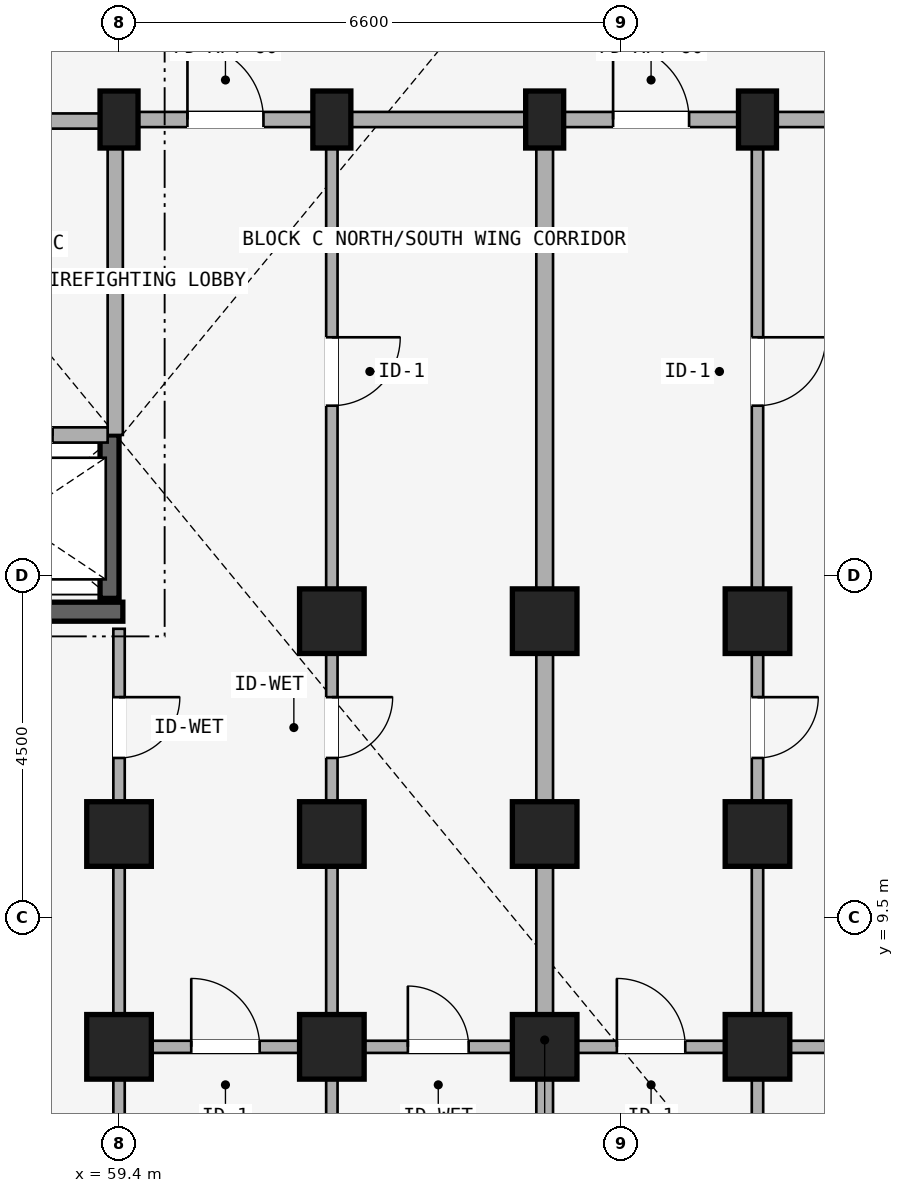
"""IFC4 building model, lengths in metres.
Left out: names, types, materials, properties, quantities, classifications, styles, units other than length and angle.
Written with IfcOpenShell. Run it as: python <this file> out.ifc"""

import sys

from ifc_helpers import new_model, si_unit, direction, frame, frame_2d, origin, origin_2d, place, context, subcontext, project, spatial, rectangle, extrude, element, fill, save


model = new_model("IFC4")
c1 = context("Model", 3, precision=1e-05, world=origin(), true_north=direction((0.0, 1.0)))
c2 = subcontext(c1, "Body", "Model", "MODEL_VIEW")
j1 = project(units=[si_unit("LENGTHUNIT", "METRE"), si_unit("PLANEANGLEUNIT", "RADIAN")], contexts=[c1])
p1 = place(None, origin())
s1 = spatial("IfcSite", under=j1, at=p1, CompositionType="ELEMENT")
p2 = place(p1, origin())
s2 = spatial("IfcBuilding", under=s1, at=p2, CompositionType="ELEMENT")
p3 = place(p2, origin())
s3 = spatial("IfcBuildingStorey", under=s2, at=p3, CompositionType="ELEMENT", Elevation=0.0)
p4 = place(p3, frame((56.65, 13.525, 0.0), z_axis=(0.0, 0.0, 1.0), x_axis=(1.0, 0.0, 0.0)))
e1 = element("IfcWall", 1, at=p4, inside=s3, PredefinedType="SHEAR", context=c2, shape_type="SweptSolid", body=[
    extrude(rectangle(XDim=2.8, YDim=0.25, at=frame_2d((1.4, 0.0))), origin(), (0.0, 0.0, 1.0), 4.15),
])
p5 = place(p3, frame((59.275, 15.85, 0.0), z_axis=(0.0, 0.0, 1.0), x_axis=(0.0, -1.0, 0.0)))
e2 = element("IfcWall", 2, at=p5, inside=s3, PredefinedType="SHEAR", context=c2, shape_type="SweptSolid", body=[
    extrude(rectangle(XDim=2.15, YDim=0.25, at=frame_2d((1.075, 0.0))), origin(), (0.0, 0.0, 1.0), 4.15),
])
p6 = place(p3, frame((59.4, 20.0, 0.0), z_axis=(0.0, 0.0, 1.0), x_axis=(1.0, 0.0, 0.0)))
e3 = element("IfcColumn", 3, at=p6, inside=s3, PredefinedType="COLUMN", context=c2, shape_type="SweptSolid", body=[
    extrude(rectangle(XDim=0.5, YDim=0.75, at=origin_2d()), origin(), (0.0, 0.0, 1.0), 4.15),
])
for number, where, z_axis, x_axis in (
    (4, (59.4, 10.6, 0.0), (0.0, 0.0, 1.0), (1.0, 0.0, 0.0)),
    (5, (59.4, 7.8, 0.0), (0.0, 0.0, 1.0), (1.0, 0.0, 0.0)),
):
    element("IfcColumn", number, at=place(p3, frame(where, z_axis=z_axis, x_axis=x_axis)), inside=s3, PredefinedType="COLUMN", context=c2, shape_type="SweptSolid", body=[
        extrude(rectangle(XDim=0.85, YDim=0.85, at=origin_2d()), origin(), (0.0, 0.0, 1.0), 4.15),
    ])
p7 = place(p3, frame((62.2, 20.0, 0.0), z_axis=(0.0, 0.0, 1.0), x_axis=(1.0, 0.0, 0.0)))
e6 = element("IfcColumn", 6, at=p7, inside=s3, PredefinedType="COLUMN", context=c2, shape_type="SweptSolid", body=[
    extrude(rectangle(XDim=0.5, YDim=0.75, at=origin_2d()), origin(), (0.0, 0.0, 1.0), 4.15),
])
for number, where, z_axis, x_axis in (
    (7, (62.2, 13.4, 0.0), (0.0, 0.0, 1.0), (1.0, 0.0, 0.0)),
    (8, (62.2, 10.6, 0.0), (0.0, 0.0, 1.0), (1.0, 0.0, 0.0)),
    (9, (62.2, 7.8, 0.0), (0.0, 0.0, 1.0), (1.0, 0.0, 0.0)),
):
    element("IfcColumn", number, at=place(p3, frame(where, z_axis=z_axis, x_axis=x_axis)), inside=s3, PredefinedType="COLUMN", context=c2, shape_type="SweptSolid", body=[
        extrude(rectangle(XDim=0.85, YDim=0.85, at=origin_2d()), origin(), (0.0, 0.0, 1.0), 4.15),
    ])
p8 = place(p3, frame((65.0, 20.0, 0.0), z_axis=(0.0, 0.0, 1.0), x_axis=(1.0, 0.0, 0.0)))
e10 = element("IfcColumn", 10, at=p8, inside=s3, PredefinedType="COLUMN", context=c2, shape_type="SweptSolid", body=[
    extrude(rectangle(XDim=0.5, YDim=0.75, at=origin_2d()), origin(), (0.0, 0.0, 1.0), 4.15),
])
for number, where, z_axis, x_axis in (
    (11, (65.0, 13.4, 0.0), (0.0, 0.0, 1.0), (1.0, 0.0, 0.0)),
    (12, (65.0, 10.6, 0.0), (0.0, 0.0, 1.0), (1.0, 0.0, 0.0)),
    (13, (65.0, 7.8, 0.0), (0.0, 0.0, 1.0), (1.0, 0.0, 0.0)),
):
    element("IfcColumn", number, at=place(p3, frame(where, z_axis=z_axis, x_axis=x_axis)), inside=s3, PredefinedType="COLUMN", context=c2, shape_type="SweptSolid", body=[
        extrude(rectangle(XDim=0.85, YDim=0.85, at=origin_2d()), origin(), (0.0, 0.0, 1.0), 4.15),
    ])
p9 = place(p3, frame((67.8, 20.0, 0.0), z_axis=(0.0, 0.0, 1.0), x_axis=(1.0, 0.0, 0.0)))
e14 = element("IfcColumn", 14, at=p9, inside=s3, PredefinedType="COLUMN", context=c2, shape_type="SweptSolid", body=[
    extrude(rectangle(XDim=0.5, YDim=0.75, at=origin_2d()), origin(), (0.0, 0.0, 1.0), 4.15),
])
for number, where, z_axis, x_axis in (
    (15, (67.8, 13.4, 0.0), (0.0, 0.0, 1.0), (1.0, 0.0, 0.0)),
    (16, (67.8, 10.6, 0.0), (0.0, 0.0, 1.0), (1.0, 0.0, 0.0)),
    (17, (67.8, 7.8, 0.0), (0.0, 0.0, 1.0), (1.0, 0.0, 0.0)),
):
    element("IfcColumn", number, at=place(p3, frame(where, z_axis=z_axis, x_axis=x_axis)), inside=s3, PredefinedType="COLUMN", context=c2, shape_type="SweptSolid", body=[
        extrude(rectangle(XDim=0.85, YDim=0.85, at=origin_2d()), origin(), (0.0, 0.0, 1.0), 4.15),
    ])
p10 = place(p3, frame((53.7, 19.98, 0.0), z_axis=(0.0, 0.0, 1.0), x_axis=(1.0, 0.0, 0.0)))
e18 = element("IfcWall", 18, at=p10, inside=s3, PredefinedType="STANDARD", context=c2, shape_type="SweptSolid", body=[
    extrude(rectangle(XDim=5.65, YDim=0.2, at=frame_2d((2.825, 0.0))), origin(), (0.0, 0.0, 1.0), 3.492),
])
p11 = place(p10, frame((1.923, 0.0, 0.0)))
e19 = element("IfcOpeningElement", 19, at=p11, cuts=e18, PredefinedType="OPENING", context=c2, shape_type="SweptSolid", body=[
    extrude(rectangle(XDim=1.24, YDim=2.15, at=frame_2d((0.62, 1.075))), frame((0.0, 0.11, 0.0), z_axis=(0.0, -1.0, 0.0), x_axis=(1.0, 0.0, 0.0)), (0.0, 0.0, 1.0), 0.22),
])
p12 = place(p3, frame((59.35, 19.98, 0.0), z_axis=(0.0, 0.0, 1.0), x_axis=(0.0, -1.0, 0.0)))
e20 = element("IfcWall", 20, at=p12, inside=s3, PredefinedType="STANDARD", context=c2, shape_type="SweptSolid", body=[
    extrude(rectangle(XDim=4.13, YDim=0.2, at=frame_2d((2.065, 0.0))), origin(), (0.0, 0.0, 1.0), 3.492),
])
p13 = place(p3, frame((56.7, 15.85, 0.0), z_axis=(0.0, 0.0, 1.0), x_axis=(1.0, 0.0, 0.0)))
e21 = element("IfcWall", 21, at=p13, inside=s3, PredefinedType="STANDARD", context=c2, shape_type="SweptSolid", body=[
    extrude(rectangle(XDim=2.55, YDim=0.2, at=frame_2d((1.275, 0.0))), origin(), (0.0, 0.0, 1.0), 3.492),
])
p14 = place(p13, frame((0.725, 0.0, 0.0)))
e22 = element("IfcOpeningElement", 22, at=p14, cuts=e21, PredefinedType="OPENING", context=c2, shape_type="SweptSolid", body=[
    extrude(rectangle(XDim=1.1, YDim=2.15, at=frame_2d((0.55, 1.075))), frame((0.0, 0.11, 0.0), z_axis=(0.0, -1.0, 0.0), x_axis=(1.0, 0.0, 0.0)), (0.0, 0.0, 1.0), 0.22),
])
p15 = place(p3, frame((59.4, 20.0, 0.0), z_axis=(0.0, 0.0, 1.0), x_axis=(1.0, 0.0, 0.0)))
e23 = element("IfcWall", 23, at=p15, inside=s3, PredefinedType="STANDARD", context=c2, shape_type="SweptSolid", body=[
    extrude(rectangle(XDim=2.8, YDim=0.2, at=frame_2d((1.4, 0.0))), origin(), (0.0, 0.0, 1.0), 3.492),
])
p16 = place(p15, frame((0.9, 0.0, 0.0)))
e24 = element("IfcOpeningElement", 24, at=p16, cuts=e23, PredefinedType="OPENING", context=c2, shape_type="SweptSolid", body=[
    extrude(rectangle(XDim=1.0, YDim=2.15, at=frame_2d((0.5, 1.075))), frame((0.0, 0.11, 0.0), z_axis=(0.0, -1.0, 0.0), x_axis=(1.0, 0.0, 0.0)), (0.0, 0.0, 1.0), 0.22),
])
p17 = place(p3, frame((59.48, 7.8, 0.0), z_axis=(0.0, 0.0, 1.0), x_axis=(1.0, 0.0, 0.0)))
e25 = element("IfcWall", 25, at=p17, inside=s3, PredefinedType="PLUMBINGWALL", context=c2, shape_type="SweptSolid", body=[
    extrude(rectangle(XDim=2.64, YDim=0.16, at=frame_2d((1.32, 0.0))), origin(), (0.0, 0.0, 1.0), 3.492),
])
p18 = place(p17, frame((0.87, 0.0, 0.0)))
e26 = element("IfcOpeningElement", 26, at=p18, cuts=e25, PredefinedType="OPENING", context=c2, shape_type="SweptSolid", body=[
    extrude(rectangle(XDim=0.9, YDim=2.1, at=frame_2d((0.45, 1.05))), frame((0.0, 0.09, 0.0), z_axis=(0.0, -1.0, 0.0), x_axis=(1.0, 0.0, 0.0)), (0.0, 0.0, 1.0), 0.18),
])
p19 = place(p3, frame((62.2, 20.0, 0.0), z_axis=(0.0, 0.0, 1.0), x_axis=(1.0, 0.0, 0.0)))
e27 = element("IfcWall", 27, at=p19, inside=s3, PredefinedType="STANDARD", context=c2, shape_type="SweptSolid", body=[
    extrude(rectangle(XDim=2.8, YDim=0.2, at=frame_2d((1.4, 0.0))), origin(), (0.0, 0.0, 1.0), 3.492),
])
p20 = place(p3, frame((62.28, 7.8, 0.0), z_axis=(0.0, 0.0, 1.0), x_axis=(1.0, 0.0, 0.0)))
e28 = element("IfcWall", 28, at=p20, inside=s3, PredefinedType="PLUMBINGWALL", context=c2, shape_type="SweptSolid", body=[
    extrude(rectangle(XDim=2.64, YDim=0.16, at=frame_2d((1.32, 0.0))), origin(), (0.0, 0.0, 1.0), 3.492),
])
p21 = place(p20, frame((0.92, 0.0, 0.0)))
e29 = element("IfcOpeningElement", 29, at=p21, cuts=e28, PredefinedType="OPENING", context=c2, shape_type="SweptSolid", body=[
    extrude(rectangle(XDim=0.8, YDim=2.1, at=frame_2d((0.4, 1.05))), frame((0.0, 0.09, 0.0), z_axis=(0.0, -1.0, 0.0), x_axis=(1.0, 0.0, 0.0)), (0.0, 0.0, 1.0), 0.18),
])
p22 = place(p3, frame((65.0, 20.0, 0.0), z_axis=(0.0, 0.0, 1.0), x_axis=(1.0, 0.0, 0.0)))
e30 = element("IfcWall", 30, at=p22, inside=s3, PredefinedType="STANDARD", context=c2, shape_type="SweptSolid", body=[
    extrude(rectangle(XDim=2.8, YDim=0.2, at=frame_2d((1.4, 0.0))), origin(), (0.0, 0.0, 1.0), 3.492),
])
p23 = place(p22, frame((0.9, 0.0, 0.0)))
e31 = element("IfcOpeningElement", 31, at=p23, cuts=e30, PredefinedType="OPENING", context=c2, shape_type="SweptSolid", body=[
    extrude(rectangle(XDim=1.0, YDim=2.15, at=frame_2d((0.5, 1.075))), frame((0.0, 0.11, 0.0), z_axis=(0.0, -1.0, 0.0), x_axis=(1.0, 0.0, 0.0)), (0.0, 0.0, 1.0), 0.22),
])
p24 = place(p3, frame((65.08, 7.8, 0.0), z_axis=(0.0, 0.0, 1.0), x_axis=(1.0, 0.0, 0.0)))
e32 = element("IfcWall", 32, at=p24, inside=s3, PredefinedType="PLUMBINGWALL", context=c2, shape_type="SweptSolid", body=[
    extrude(rectangle(XDim=2.64, YDim=0.16, at=frame_2d((1.32, 0.0))), origin(), (0.0, 0.0, 1.0), 3.492),
])
p25 = place(p24, frame((0.87, 0.0, 0.0)))
e33 = element("IfcOpeningElement", 33, at=p25, cuts=e32, PredefinedType="OPENING", context=c2, shape_type="SweptSolid", body=[
    extrude(rectangle(XDim=0.9, YDim=2.1, at=frame_2d((0.45, 1.05))), frame((0.0, 0.09, 0.0), z_axis=(0.0, -1.0, 0.0), x_axis=(1.0, 0.0, 0.0)), (0.0, 0.0, 1.0), 0.18),
])
p26 = place(p3, frame((67.8, 20.0, 0.0), z_axis=(0.0, 0.0, 1.0), x_axis=(1.0, 0.0, 0.0)))
e34 = element("IfcWall", 34, at=p26, inside=s3, PredefinedType="STANDARD", context=c2, shape_type="SweptSolid", body=[
    extrude(rectangle(XDim=2.8, YDim=0.2, at=frame_2d((1.4, 0.0))), origin(), (0.0, 0.0, 1.0), 3.492),
])
p27 = place(p3, frame((67.88, 7.8, 0.0), z_axis=(0.0, 0.0, 1.0), x_axis=(1.0, 0.0, 0.0)))
e35 = element("IfcWall", 35, at=p27, inside=s3, PredefinedType="PLUMBINGWALL", context=c2, shape_type="SweptSolid", body=[
    extrude(rectangle(XDim=2.64, YDim=0.16, at=frame_2d((1.32, 0.0))), origin(), (0.0, 0.0, 1.0), 3.492),
])
p28 = place(p27, frame((0.92, 0.0, 0.0)))
e36 = element("IfcOpeningElement", 36, at=p28, cuts=e35, PredefinedType="OPENING", context=c2, shape_type="SweptSolid", body=[
    extrude(rectangle(XDim=0.8, YDim=2.1, at=frame_2d((0.4, 1.05))), frame((0.0, 0.09, 0.0), z_axis=(0.0, -1.0, 0.0), x_axis=(1.0, 0.0, 0.0)), (0.0, 0.0, 1.0), 0.18),
])
p29 = place(p3, frame((59.4, 13.3, 0.0), z_axis=(0.0, 0.0, 1.0), x_axis=(0.0, -1.0, 0.0)))
e37 = element("IfcWall", 37, at=p29, inside=s3, PredefinedType="PARTITIONING", context=c2, shape_type="SweptSolid", body=[
    extrude(rectangle(XDim=10.82, YDim=0.15, at=frame_2d((5.41, 0.0))), origin(), (0.0, 0.0, 1.0), 3.492),
])
p30 = place(p29, frame((0.899, 0.0, 0.0)))
e38 = element("IfcOpeningElement", 38, at=p30, cuts=e37, PredefinedType="OPENING", context=c2, shape_type="SweptSolid", body=[
    extrude(rectangle(XDim=0.8, YDim=2.1, at=frame_2d((0.4, 1.05))), frame((0.0, 0.085, 0.0), z_axis=(0.0, -1.0, 0.0), x_axis=(1.0, 0.0, 0.0)), (0.0, 0.0, 1.0), 0.17),
])
p31 = place(p3, frame((62.2, 19.95, 0.0), z_axis=(0.0, 0.0, 1.0), x_axis=(0.0, -1.0, 0.0)))
e39 = element("IfcWall", 39, at=p31, inside=s3, PredefinedType="PARTITIONING", context=c2, shape_type="SweptSolid", body=[
    extrude(rectangle(XDim=6.53, YDim=0.15, at=frame_2d((3.265, 0.0))), origin(), (0.0, 0.0, 1.0), 3.492),
])
p32 = place(p31, frame((2.815, 0.0, 0.0)))
e40 = element("IfcOpeningElement", 40, at=p32, cuts=e39, PredefinedType="OPENING", context=c2, shape_type="SweptSolid", body=[
    extrude(rectangle(XDim=0.9, YDim=2.1, at=frame_2d((0.45, 1.05))), frame((0.0, 0.085, 0.0), z_axis=(0.0, -1.0, 0.0), x_axis=(1.0, 0.0, 0.0)), (0.0, 0.0, 1.0), 0.17),
])
p33 = place(p3, frame((62.2, 13.3, 0.0), z_axis=(0.0, 0.0, 1.0), x_axis=(0.0, -1.0, 0.0)))
e41 = element("IfcWall", 41, at=p33, inside=s3, PredefinedType="PARTITIONING", context=c2, shape_type="SweptSolid", body=[
    extrude(rectangle(XDim=10.82, YDim=0.15, at=frame_2d((5.41, 0.0))), origin(), (0.0, 0.0, 1.0), 3.492),
])
p34 = place(p33, frame((0.899, 0.0, 0.0)))
e42 = element("IfcOpeningElement", 42, at=p34, cuts=e41, PredefinedType="OPENING", context=c2, shape_type="SweptSolid", body=[
    extrude(rectangle(XDim=0.8, YDim=2.1, at=frame_2d((0.4, 1.05))), frame((0.0, 0.085, 0.0), z_axis=(0.0, -1.0, 0.0), x_axis=(1.0, 0.0, 0.0)), (0.0, 0.0, 1.0), 0.17),
])
p35 = place(p3, frame((65.0, 19.95, 0.0), z_axis=(0.0, 0.0, 1.0), x_axis=(0.0, -1.0, 0.0)))
e43 = element("IfcWall", 43, at=p35, inside=s3, PredefinedType="STANDARD", context=c2, shape_type="SweptSolid", body=[
    extrude(rectangle(XDim=6.53, YDim=0.22, at=frame_2d((3.265, 0.0))), origin(), (0.0, 0.0, 1.0), 3.492),
])
p36 = place(p3, frame((65.0, 13.3, 0.0), z_axis=(0.0, 0.0, 1.0), x_axis=(0.0, -1.0, 0.0)))
e44 = element("IfcWall", 44, at=p36, inside=s3, PredefinedType="STANDARD", context=c2, shape_type="SweptSolid", body=[
    extrude(rectangle(XDim=10.82, YDim=0.22, at=frame_2d((5.41, 0.0))), origin(), (0.0, 0.0, 1.0), 3.492),
])
p37 = place(p3, frame((67.8, 19.95, 0.0), z_axis=(0.0, 0.0, 1.0), x_axis=(0.0, -1.0, 0.0)))
e45 = element("IfcWall", 45, at=p37, inside=s3, PredefinedType="PARTITIONING", context=c2, shape_type="SweptSolid", body=[
    extrude(rectangle(XDim=6.53, YDim=0.15, at=frame_2d((3.265, 0.0))), origin(), (0.0, 0.0, 1.0), 3.492),
])
p38 = place(p37, frame((2.815, 0.0, 0.0)))
e46 = element("IfcOpeningElement", 46, at=p38, cuts=e45, PredefinedType="OPENING", context=c2, shape_type="SweptSolid", body=[
    extrude(rectangle(XDim=0.9, YDim=2.1, at=frame_2d((0.45, 1.05))), frame((0.0, 0.085, 0.0), z_axis=(0.0, -1.0, 0.0), x_axis=(1.0, 0.0, 0.0)), (0.0, 0.0, 1.0), 0.17),
])
p39 = place(p3, frame((67.8, 13.3, 0.0), z_axis=(0.0, 0.0, 1.0), x_axis=(0.0, -1.0, 0.0)))
e47 = element("IfcWall", 47, at=p39, inside=s3, PredefinedType="PARTITIONING", context=c2, shape_type="SweptSolid", body=[
    extrude(rectangle(XDim=10.82, YDim=0.15, at=frame_2d((5.41, 0.0))), origin(), (0.0, 0.0, 1.0), 3.492),
])
p40 = place(p39, frame((0.899, 0.0, 0.0)))
e48 = element("IfcOpeningElement", 48, at=p40, cuts=e47, PredefinedType="OPENING", context=c2, shape_type="SweptSolid", body=[
    extrude(rectangle(XDim=0.8, YDim=2.1, at=frame_2d((0.4, 1.05))), frame((0.0, 0.085, 0.0), z_axis=(0.0, -1.0, 0.0), x_axis=(1.0, 0.0, 0.0)), (0.0, 0.0, 1.0), 0.17),
])
p41 = place(p14, origin())
e49 = element("IfcDoor", 49, at=p41, inside=s3, OperationType="SLIDING_TO_LEFT", PredefinedType="DOOR", context=c2, shape_type="SweptSolid", body=[
    extrude(rectangle(XDim=1.1, YDim=2.15, at=frame_2d((0.55, 1.075))), frame((0.0, 0.025, 0.0), z_axis=(0.0, -1.0, 0.0), x_axis=(1.0, 0.0, 0.0)), (0.0, 0.0, 1.0), 0.05),
])
fill(e22, e49)
p42 = place(p18, origin())
e50 = element("IfcDoor", 50, at=p42, inside=s3, OperationType="SINGLE_SWING_LEFT", PredefinedType="DOOR", context=c2, shape_type="SweptSolid", body=[
    extrude(rectangle(XDim=0.9, YDim=2.1, at=frame_2d((0.45, 1.05))), frame((0.0, 0.025, 0.0), z_axis=(0.0, -1.0, 0.0), x_axis=(1.0, 0.0, 0.0)), (0.0, 0.0, 1.0), 0.05),
])
fill(e26, e50)
p43 = place(p16, frame((1.0, 0.0, 0.0), z_axis=(0.0, 0.0, 1.0), x_axis=(-1.0, 0.0, 0.0)))
e51 = element("IfcDoor", 51, at=p43, inside=s3, OperationType="SINGLE_SWING_RIGHT", PredefinedType="DOOR", context=c2, shape_type="SweptSolid", body=[
    extrude(rectangle(XDim=1.0, YDim=2.15, at=frame_2d((0.5, 1.075))), frame((0.0, 0.025, 0.0), z_axis=(0.0, -1.0, 0.0), x_axis=(1.0, 0.0, 0.0)), (0.0, 0.0, 1.0), 0.05),
])
fill(e24, e51)
p44 = place(p21, origin())
e52 = element("IfcDoor", 52, at=p44, inside=s3, OperationType="SINGLE_SWING_LEFT", PredefinedType="DOOR", context=c2, shape_type="SweptSolid", body=[
    extrude(rectangle(XDim=0.8, YDim=2.1, at=frame_2d((0.4, 1.05))), frame((0.0, 0.025, 0.0), z_axis=(0.0, -1.0, 0.0), x_axis=(1.0, 0.0, 0.0)), (0.0, 0.0, 1.0), 0.05),
])
fill(e29, e52)
p45 = place(p25, origin())
e53 = element("IfcDoor", 53, at=p45, inside=s3, OperationType="SINGLE_SWING_LEFT", PredefinedType="DOOR", context=c2, shape_type="SweptSolid", body=[
    extrude(rectangle(XDim=0.9, YDim=2.1, at=frame_2d((0.45, 1.05))), frame((0.0, 0.025, 0.0), z_axis=(0.0, -1.0, 0.0), x_axis=(1.0, 0.0, 0.0)), (0.0, 0.0, 1.0), 0.05),
])
fill(e33, e53)
p46 = place(p23, frame((1.0, 0.0, 0.0), z_axis=(0.0, 0.0, 1.0), x_axis=(-1.0, 0.0, 0.0)))
e54 = element("IfcDoor", 54, at=p46, inside=s3, OperationType="SINGLE_SWING_RIGHT", PredefinedType="DOOR", context=c2, shape_type="SweptSolid", body=[
    extrude(rectangle(XDim=1.0, YDim=2.15, at=frame_2d((0.5, 1.075))), frame((0.0, 0.025, 0.0), z_axis=(0.0, -1.0, 0.0), x_axis=(1.0, 0.0, 0.0)), (0.0, 0.0, 1.0), 0.05),
])
fill(e31, e54)
p47 = place(p30, frame((0.8, 0.0, 0.0), z_axis=(0.0, 0.0, 1.0), x_axis=(-1.0, 0.0, 0.0)))
e55 = element("IfcDoor", 55, at=p47, inside=s3, OperationType="SINGLE_SWING_RIGHT", PredefinedType="DOOR", context=c2, shape_type="SweptSolid", body=[
    extrude(rectangle(XDim=0.8, YDim=2.1, at=frame_2d((0.4, 1.05))), frame((0.0, 0.025, 0.0), z_axis=(0.0, -1.0, 0.0), x_axis=(1.0, 0.0, 0.0)), (0.0, 0.0, 1.0), 0.05),
])
fill(e38, e55)
p48 = place(p32, frame((0.9, 0.0, 0.0), z_axis=(0.0, 0.0, 1.0), x_axis=(-1.0, 0.0, 0.0)))
e56 = element("IfcDoor", 56, at=p48, inside=s3, OperationType="SINGLE_SWING_RIGHT", PredefinedType="DOOR", context=c2, shape_type="SweptSolid", body=[
    extrude(rectangle(XDim=0.9, YDim=2.1, at=frame_2d((0.45, 1.05))), frame((0.0, 0.025, 0.0), z_axis=(0.0, -1.0, 0.0), x_axis=(1.0, 0.0, 0.0)), (0.0, 0.0, 1.0), 0.05),
])
fill(e40, e56)
p49 = place(p34, origin())
e57 = element("IfcDoor", 57, at=p49, inside=s3, OperationType="SINGLE_SWING_LEFT", PredefinedType="DOOR", context=c2, shape_type="SweptSolid", body=[
    extrude(rectangle(XDim=0.8, YDim=2.1, at=frame_2d((0.4, 1.05))), frame((0.0, 0.025, 0.0), z_axis=(0.0, -1.0, 0.0), x_axis=(1.0, 0.0, 0.0)), (0.0, 0.0, 1.0), 0.05),
])
fill(e42, e57)
p50 = place(p38, origin())
e58 = element("IfcDoor", 58, at=p50, inside=s3, OperationType="SINGLE_SWING_LEFT", PredefinedType="DOOR", context=c2, shape_type="SweptSolid", body=[
    extrude(rectangle(XDim=0.9, YDim=2.1, at=frame_2d((0.45, 1.05))), frame((0.0, 0.025, 0.0), z_axis=(0.0, -1.0, 0.0), x_axis=(1.0, 0.0, 0.0)), (0.0, 0.0, 1.0), 0.05),
])
fill(e46, e58)
p51 = place(p40, frame((0.8, 0.0, 0.0), z_axis=(0.0, 0.0, 1.0), x_axis=(-1.0, 0.0, 0.0)))
e59 = element("IfcDoor", 59, at=p51, inside=s3, OperationType="SINGLE_SWING_RIGHT", PredefinedType="DOOR", context=c2, shape_type="SweptSolid", body=[
    extrude(rectangle(XDim=0.8, YDim=2.1, at=frame_2d((0.4, 1.05))), frame((0.0, 0.025, 0.0), z_axis=(0.0, -1.0, 0.0), x_axis=(1.0, 0.0, 0.0)), (0.0, 0.0, 1.0), 0.05),
])
fill(e48, e59)
save(model, sys.argv[1])
